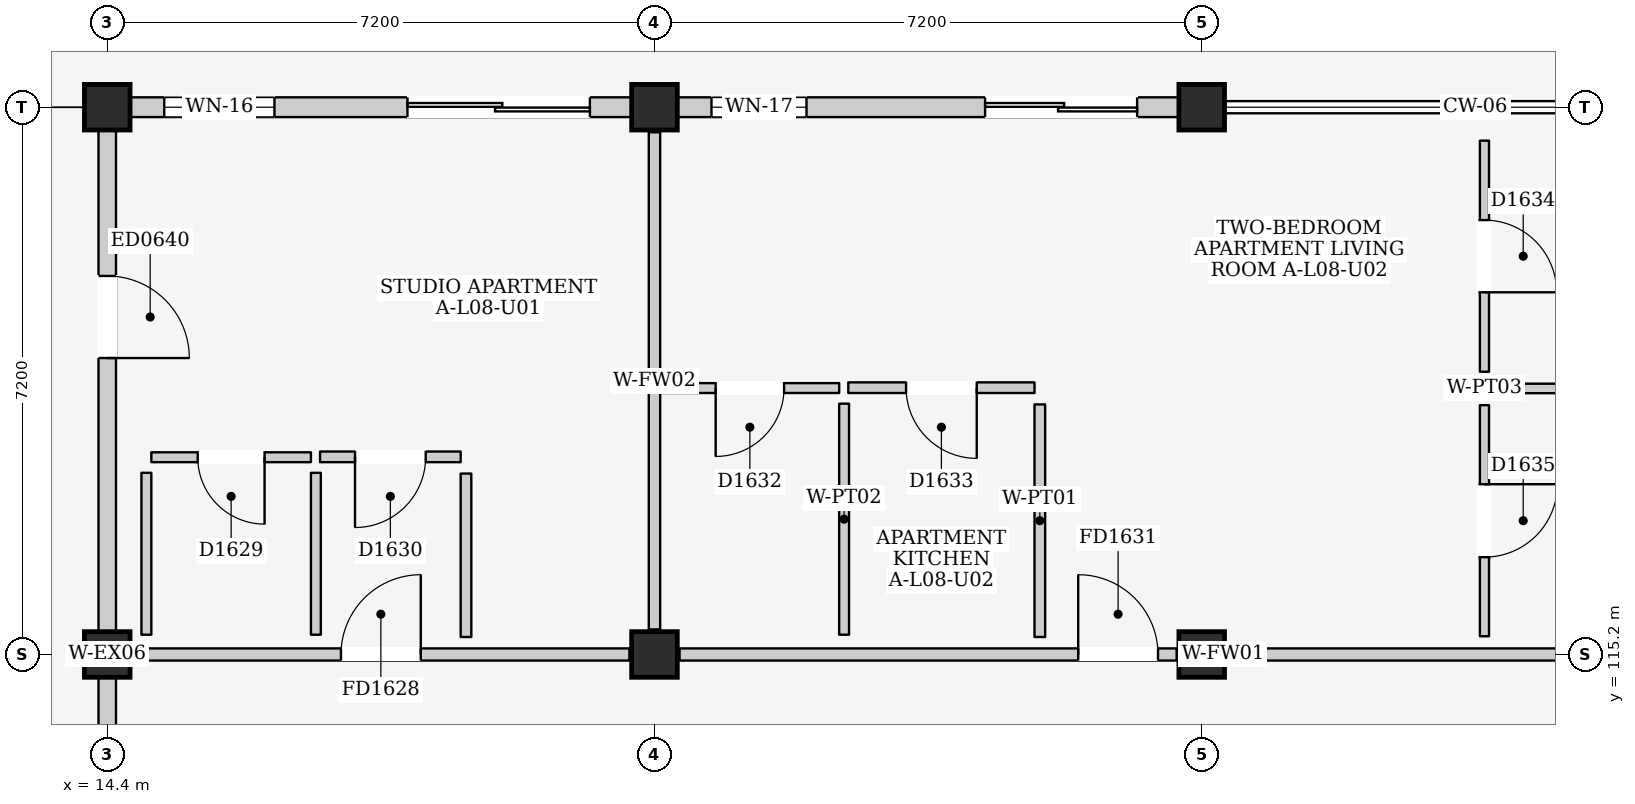
"""IFC4 building model, lengths in metres.
Left out: names, types, materials, properties, quantities, classifications, styles, units other than length and angle.
Written with IfcOpenShell. Run it as: python <this file> out.ifc"""

import sys

from ifc_helpers import new_model, si_unit, direction, frame, frame_2d, origin, origin_2d, place, context, subcontext, project, spatial, rectangle, extrude, element, fill, save


model = new_model("IFC4")
c1 = context("Model", 3, precision=1e-05, world=origin(), true_north=direction((0.0, 1.0)))
c2 = subcontext(c1, "Body", "Model", "MODEL_VIEW")
j1 = project(units=[si_unit("LENGTHUNIT", "METRE"), si_unit("PLANEANGLEUNIT", "RADIAN")], contexts=[c1])
p1 = place(None, origin())
s1 = spatial("IfcSite", under=j1, at=p1, CompositionType="ELEMENT")
p2 = place(p1, origin())
s2 = spatial("IfcBuilding", under=s1, at=p2, CompositionType="ELEMENT")
p3 = place(p2, frame((0.0, 0.0, 28.3)))
s3 = spatial("IfcBuildingStorey", under=s2, at=p3, CompositionType="ELEMENT", Elevation=28.3)
for number, where, z_axis, x_axis in (
    (1, (14.4, 115.2, 0.0), (0.0, 0.0, 1.0), (1.0, 0.0, 0.0)),
    (2, (14.4, 122.4, 0.0), (0.0, 0.0, 1.0), (1.0, 0.0, 0.0)),
    (3, (21.6, 115.2, 0.0), (0.0, 0.0, 1.0), (1.0, 0.0, 0.0)),
    (4, (21.6, 122.4, 0.0), (0.0, 0.0, 1.0), (1.0, 0.0, 0.0)),
    (5, (28.8, 115.2, 0.0), (0.0, 0.0, 1.0), (1.0, 0.0, 0.0)),
    (6, (28.8, 122.4, 0.0), (0.0, 0.0, 1.0), (1.0, 0.0, 0.0)),
):
    element("IfcColumn", number, at=place(p3, frame(where, z_axis=z_axis, x_axis=x_axis)), inside=s3, PredefinedType="COLUMN", context=c2, shape_type="SweptSolid", body=[
        extrude(rectangle(XDim=0.6, YDim=0.6, at=origin_2d()), origin(), (0.0, 0.0, 1.0), 3.2),
    ])
p4 = place(p3, frame((14.7, 122.4, 0.0), z_axis=(0.0, 0.0, 1.0), x_axis=(1.0, 0.0, 0.0)))
e7 = element("IfcWall", 7, at=p4, inside=s3, PredefinedType="ELEMENTEDWALL", context=c2, shape_type="SweptSolid", body=[
    extrude(rectangle(XDim=6.6, YDim=0.26, at=frame_2d((3.3, 0.0))), origin(), (0.0, 0.0, 1.0), 2.485),
])
p5 = place(p4, frame((3.65, 0.0, 0.0)))
e8 = element("IfcOpeningElement", 8, at=p5, cuts=e7, PredefinedType="OPENING", context=c2, shape_type="SweptSolid", body=[
    extrude(rectangle(XDim=2.4, YDim=2.12, at=frame_2d((1.2, 1.06))), frame((0.0, 0.145, 0.0), z_axis=(0.0, -1.0, 0.0), x_axis=(1.0, 0.0, 0.0)), (0.0, 0.0, 1.0), 0.29),
])
p6 = place(p4, frame((0.45, 0.0, 0.9)))
e9 = element("IfcOpeningElement", 9, at=p6, cuts=e7, PredefinedType="OPENING", context=c2, shape_type="SweptSolid", body=[
    extrude(rectangle(XDim=1.45, YDim=1.4, at=frame_2d((0.725, 0.7))), frame((0.0, 0.145, 0.0), z_axis=(0.0, -1.0, 0.0), x_axis=(1.0, 0.0, 0.0)), (0.0, 0.0, 1.0), 0.29),
])
p7 = place(p3, frame((21.9, 122.4, 0.0), z_axis=(0.0, 0.0, 1.0), x_axis=(1.0, 0.0, 0.0)))
e10 = element("IfcWall", 10, at=p7, inside=s3, PredefinedType="ELEMENTEDWALL", context=c2, shape_type="SweptSolid", body=[
    extrude(rectangle(XDim=6.6, YDim=0.26, at=frame_2d((3.3, 0.0))), origin(), (0.0, 0.0, 1.0), 2.485),
])
p8 = place(p7, frame((4.05, 0.0, 0.0)))
e11 = element("IfcOpeningElement", 11, at=p8, cuts=e10, PredefinedType="OPENING", context=c2, shape_type="SweptSolid", body=[
    extrude(rectangle(XDim=2.0, YDim=2.12, at=frame_2d((1.0, 1.06))), frame((0.0, 0.145, 0.0), z_axis=(0.0, -1.0, 0.0), x_axis=(1.0, 0.0, 0.0)), (0.0, 0.0, 1.0), 0.29),
])
p9 = place(p7, frame((0.45, 0.0, 0.9)))
e12 = element("IfcOpeningElement", 12, at=p9, cuts=e10, PredefinedType="OPENING", context=c2, shape_type="SweptSolid", body=[
    extrude(rectangle(XDim=1.25, YDim=1.3, at=frame_2d((0.625, 0.65))), frame((0.0, 0.145, 0.0), z_axis=(0.0, -1.0, 0.0), x_axis=(1.0, 0.0, 0.0)), (0.0, 0.0, 1.0), 0.29),
])
p10 = place(p3, frame((14.4, 108.3, 0.0), z_axis=(0.0, 0.0, 1.0), x_axis=(0.0, 1.0, 0.0)))
e13 = element("IfcWall", 13, at=p10, inside=s3, PredefinedType="ELEMENTEDWALL", context=c2, shape_type="SweptSolid", body=[
    extrude(rectangle(XDim=6.6, YDim=0.23, at=frame_2d((3.3, 0.0))), origin(), (0.0, 0.0, 1.0), 2.435),
])
p11 = place(p10, frame((2.75, 0.0, 1.1)))
e14 = element("IfcOpeningElement", 14, at=p11, cuts=e13, PredefinedType="OPENING", context=c2, shape_type="SweptSolid", body=[
    extrude(rectangle(XDim=1.0, YDim=0.9, at=frame_2d((0.5, 0.45))), frame((0.0, 0.13, 0.0), z_axis=(0.0, -1.0, 0.0), x_axis=(1.0, 0.0, 0.0)), (0.0, 0.0, 1.0), 0.26),
])
p12 = place(p3, frame((14.4, 115.5, 0.0), z_axis=(0.0, 0.0, 1.0), x_axis=(0.0, 1.0, 0.0)))
e15 = element("IfcWall", 15, at=p12, inside=s3, PredefinedType="ELEMENTEDWALL", context=c2, shape_type="SweptSolid", body=[
    extrude(rectangle(XDim=6.6, YDim=0.23, at=frame_2d((3.3, 0.0))), origin(), (0.0, 0.0, 1.0), 2.435),
])
p13 = place(p12, frame((3.6, 0.0, 0.0)))
e16 = element("IfcOpeningElement", 16, at=p13, cuts=e15, PredefinedType="OPENING", context=c2, shape_type="SweptSolid", body=[
    extrude(rectangle(XDim=1.08, YDim=2.12, at=frame_2d((0.54, 1.06))), frame((0.0, 0.13, 0.0), z_axis=(0.0, -1.0, 0.0), x_axis=(1.0, 0.0, 0.0)), (0.0, 0.0, 1.0), 0.26),
])
p14 = place(p3, frame((14.73, 115.2, 0.0), z_axis=(0.0, 0.0, 1.0), x_axis=(1.0, 0.0, 0.0)))
e17 = element("IfcWall", 17, at=p14, inside=s3, PredefinedType="PARTITIONING", context=c2, shape_type="SweptSolid", body=[
    extrude(rectangle(XDim=6.54, YDim=0.16, at=frame_2d((3.27, 0.0))), origin(), (0.0, 0.0, 1.0), 2.285),
])
p15 = place(p14, frame((2.745, 0.0, 0.0)))
e18 = element("IfcOpeningElement", 18, at=p15, cuts=e17, PredefinedType="OPENING", context=c2, shape_type="SweptSolid", body=[
    extrude(rectangle(XDim=1.05, YDim=2.15, at=frame_2d((0.525, 1.075))), frame((0.0, 0.095, 0.0), z_axis=(0.0, -1.0, 0.0), x_axis=(1.0, 0.0, 0.0)), (0.0, 0.0, 1.0), 0.19),
])
p16 = place(p3, frame((21.6, 115.53, 0.0), z_axis=(0.0, 0.0, 1.0), x_axis=(0.0, 1.0, 0.0)))
e19 = element("IfcWall", 19, at=p16, inside=s3, PredefinedType="PARTITIONING", context=c2, shape_type="SweptSolid", body=[
    extrude(rectangle(XDim=6.54, YDim=0.15, at=frame_2d((3.27, 0.0))), origin(), (0.0, 0.0, 1.0), 2.435),
])
p17 = place(p3, frame((14.98, 117.795, 0.0), z_axis=(0.0, 0.0, 1.0), x_axis=(1.0, 0.0, 0.0)))
e20 = element("IfcWall", 20, at=p17, inside=s3, PredefinedType="PARTITIONING", context=c2, shape_type="SweptSolid", body=[
    extrude(rectangle(XDim=2.1, YDim=0.13, at=frame_2d((1.05, 0.0))), origin(), (0.0, 0.0, 1.0), 2.95),
])
p18 = place(p17, frame((0.61, 0.0, 0.0)))
e21 = element("IfcOpeningElement", 21, at=p18, cuts=e20, PredefinedType="OPENING", context=c2, shape_type="SweptSolid", body=[
    extrude(rectangle(XDim=0.88, YDim=2.1, at=frame_2d((0.44, 1.05))), frame((0.0, 0.08, 0.0), z_axis=(0.0, -1.0, 0.0), x_axis=(1.0, 0.0, 0.0)), (0.0, 0.0, 1.0), 0.16),
])
for number, where, z_axis, x_axis in (
    (22, (17.145, 115.46, 0.0), (0.0, 0.0, 1.0), (0.0, 1.0, 0.0)),
    (23, (14.915, 115.46, 0.0), (0.0, 0.0, 1.0), (0.0, 1.0, 0.0)),
):
    element("IfcWall", number, at=place(p3, frame(where, z_axis=z_axis, x_axis=x_axis)), inside=s3, PredefinedType="PARTITIONING", context=c2, shape_type="SweptSolid", body=[
        extrude(rectangle(XDim=2.13, YDim=0.13, at=frame_2d((1.065, 0.0))), origin(), (0.0, 0.0, 1.0), 2.95),
    ])
p19 = place(p3, frame((17.2, 117.8, 0.0), z_axis=(0.0, 0.0, 1.0), x_axis=(1.0, 0.0, 0.0)))
e24 = element("IfcWall", 24, at=p19, inside=s3, PredefinedType="PARTITIONING", context=c2, shape_type="SweptSolid", body=[
    extrude(rectangle(XDim=1.85, YDim=0.14, at=frame_2d((0.925, 0.0))), origin(), (0.0, 0.0, 1.0), 2.95),
])
p20 = place(p19, frame((0.46, 0.0, 0.0)))
e25 = element("IfcOpeningElement", 25, at=p20, cuts=e24, PredefinedType="OPENING", context=c2, shape_type="SweptSolid", body=[
    extrude(rectangle(XDim=0.93, YDim=2.14, at=frame_2d((0.465, 1.07))), frame((0.0, 0.085, 0.0), z_axis=(0.0, -1.0, 0.0), x_axis=(1.0, 0.0, 0.0)), (0.0, 0.0, 1.0), 0.17),
])
p21 = place(p3, frame((19.12, 115.43, 0.0), z_axis=(0.0, 0.0, 1.0), x_axis=(0.0, 1.0, 0.0)))
e26 = element("IfcWall", 26, at=p21, inside=s3, PredefinedType="PARTITIONING", context=c2, shape_type="SweptSolid", body=[
    extrude(rectangle(XDim=2.15, YDim=0.14, at=frame_2d((1.075, 0.0))), origin(), (0.0, 0.0, 1.0), 2.95),
])
p22 = place(p3, frame((21.93, 115.2, 0.0), z_axis=(0.0, 0.0, 1.0), x_axis=(1.0, 0.0, 0.0)))
e27 = element("IfcWall", 27, at=p22, inside=s3, PredefinedType="PARTITIONING", context=c2, shape_type="SweptSolid", body=[
    extrude(rectangle(XDim=6.54, YDim=0.16, at=frame_2d((3.27, 0.0))), origin(), (0.0, 0.0, 1.0), 2.285),
])
p23 = place(p22, frame((5.245, 0.0, 0.0)))
e28 = element("IfcOpeningElement", 28, at=p23, cuts=e27, PredefinedType="OPENING", context=c2, shape_type="SweptSolid", body=[
    extrude(rectangle(XDim=1.05, YDim=2.15, at=frame_2d((0.525, 1.075))), frame((0.0, 0.095, 0.0), z_axis=(0.0, -1.0, 0.0), x_axis=(1.0, 0.0, 0.0)), (0.0, 0.0, 1.0), 0.19),
])
p24 = place(p3, frame((29.13, 115.2, 0.0), z_axis=(0.0, 0.0, 1.0), x_axis=(1.0, 0.0, 0.0)))
e29 = element("IfcWall", 29, at=p24, inside=s3, PredefinedType="PARTITIONING", context=c2, shape_type="SweptSolid", body=[
    extrude(rectangle(XDim=6.54, YDim=0.16, at=frame_2d((3.27, 0.0))), origin(), (0.0, 0.0, 1.0), 2.285),
])
p25 = place(p3, frame((21.68, 118.705, 0.0), z_axis=(0.0, 0.0, 1.0), x_axis=(1.0, 0.0, 0.0)))
e30 = element("IfcWall", 30, at=p25, inside=s3, PredefinedType="PARTITIONING", context=c2, shape_type="SweptSolid", body=[
    extrude(rectangle(XDim=2.35, YDim=0.13, at=frame_2d((1.175, 0.0))), origin(), (0.0, 0.0, 1.0), 2.95),
])
p26 = place(p25, frame((0.725, 0.0, 0.0)))
e31 = element("IfcOpeningElement", 31, at=p26, cuts=e30, PredefinedType="OPENING", context=c2, shape_type="SweptSolid", body=[
    extrude(rectangle(XDim=0.9, YDim=2.1, at=frame_2d((0.45, 1.05))), frame((0.0, 0.08, 0.0), z_axis=(0.0, -1.0, 0.0), x_axis=(1.0, 0.0, 0.0)), (0.0, 0.0, 1.0), 0.16),
])
p27 = place(p3, frame((24.095, 115.46, 0.0), z_axis=(0.0, 0.0, 1.0), x_axis=(0.0, 1.0, 0.0)))
e32 = element("IfcWall", 32, at=p27, inside=s3, PredefinedType="PARTITIONING", context=c2, shape_type="SweptSolid", body=[
    extrude(rectangle(XDim=3.04, YDim=0.13, at=frame_2d((1.52, 0.0))), origin(), (0.0, 0.0, 1.0), 2.95),
])
p28 = place(p3, frame((24.15, 118.71, 0.0), z_axis=(0.0, 0.0, 1.0), x_axis=(1.0, 0.0, 0.0)))
e33 = element("IfcWall", 33, at=p28, inside=s3, PredefinedType="PARTITIONING", context=c2, shape_type="SweptSolid", body=[
    extrude(rectangle(XDim=2.45, YDim=0.14, at=frame_2d((1.225, 0.0))), origin(), (0.0, 0.0, 1.0), 2.95),
])
p29 = place(p28, frame((0.76, 0.0, 0.0)))
e34 = element("IfcOpeningElement", 34, at=p29, cuts=e33, PredefinedType="OPENING", context=c2, shape_type="SweptSolid", body=[
    extrude(rectangle(XDim=0.93, YDim=2.14, at=frame_2d((0.465, 1.07))), frame((0.0, 0.085, 0.0), z_axis=(0.0, -1.0, 0.0), x_axis=(1.0, 0.0, 0.0)), (0.0, 0.0, 1.0), 0.17),
])
p30 = place(p3, frame((26.67, 115.43, 0.0), z_axis=(0.0, 0.0, 1.0), x_axis=(0.0, 1.0, 0.0)))
e35 = element("IfcWall", 35, at=p30, inside=s3, PredefinedType="PARTITIONING", context=c2, shape_type="SweptSolid", body=[
    extrude(rectangle(XDim=3.06, YDim=0.14, at=frame_2d((1.53, 0.0))), origin(), (0.0, 0.0, 1.0), 2.95),
])
p31 = place(p3, frame((32.52, 118.92, 0.0), z_axis=(0.0, 0.0, 1.0), x_axis=(0.0, 1.0, 0.0)))
e36 = element("IfcWall", 36, at=p31, inside=s3, PredefinedType="PARTITIONING", context=c2, shape_type="SweptSolid", body=[
    extrude(rectangle(XDim=3.04, YDim=0.12, at=frame_2d((1.52, 0.0))), origin(), (0.0, 0.0, 1.0), 2.95),
])
p32 = place(p31, frame((1.045, 0.0, 0.0)))
e37 = element("IfcOpeningElement", 37, at=p32, cuts=e36, PredefinedType="OPENING", context=c2, shape_type="SweptSolid", body=[
    extrude(rectangle(XDim=0.95, YDim=2.15, at=frame_2d((0.475, 1.075))), frame((0.0, 0.075, 0.0), z_axis=(0.0, -1.0, 0.0), x_axis=(1.0, 0.0, 0.0)), (0.0, 0.0, 1.0), 0.15),
])
p33 = place(p3, frame((32.72, 118.7, 0.0), z_axis=(0.0, 0.0, 1.0), x_axis=(1.0, 0.0, 0.0)))
e38 = element("IfcWall", 38, at=p33, inside=s3, PredefinedType="PARTITIONING", context=c2, shape_type="SweptSolid", body=[
    extrude(rectangle(XDim=3.06, YDim=0.125, at=frame_2d((1.53, 0.0))), origin(), (0.0, 0.0, 1.0), 2.95),
])
p34 = place(p3, frame((32.52, 115.44, 0.0), z_axis=(0.0, 0.0, 1.0), x_axis=(0.0, 1.0, 0.0)))
e39 = element("IfcWall", 39, at=p34, inside=s3, PredefinedType="PARTITIONING", context=c2, shape_type="SweptSolid", body=[
    extrude(rectangle(XDim=3.04, YDim=0.12, at=frame_2d((1.52, 0.0))), origin(), (0.0, 0.0, 1.0), 2.95),
])
p35 = place(p34, frame((1.04, 0.0, 0.0)))
e40 = element("IfcOpeningElement", 40, at=p35, cuts=e39, PredefinedType="OPENING", context=c2, shape_type="SweptSolid", body=[
    extrude(rectangle(XDim=0.96, YDim=2.15, at=frame_2d((0.48, 1.075))), frame((0.0, 0.075, 0.0), z_axis=(0.0, -1.0, 0.0), x_axis=(1.0, 0.0, 0.0)), (0.0, 0.0, 1.0), 0.15),
])
p36 = place(p5, frame((2.4, 0.0, 0.0), z_axis=(0.0, 0.0, 1.0), x_axis=(-1.0, 0.0, 0.0)))
e41 = element("IfcDoor", 41, at=p36, inside=s3, OperationType="DOUBLE_DOOR_SLIDING", PredefinedType="DOOR", context=c2, shape_type="SweptSolid", body=[
    extrude(rectangle(XDim=2.4, YDim=2.12, at=frame_2d((1.2, 1.06))), frame((0.0, 0.025, 0.0), z_axis=(0.0, -1.0, 0.0), x_axis=(1.0, 0.0, 0.0)), (0.0, 0.0, 1.0), 0.05),
])
fill(e8, e41)
p37 = place(p6, origin())
e42 = element("IfcWindow", 42, at=p37, inside=s3, PartitioningType="DOUBLE_PANEL_VERTICAL", PredefinedType="WINDOW", context=c2, shape_type="SweptSolid", body=[
    extrude(rectangle(XDim=1.45, YDim=1.4, at=frame_2d((0.725, 0.7))), frame((0.0, 0.03, 0.0), z_axis=(0.0, -1.0, 0.0), x_axis=(1.0, 0.0, 0.0)), (0.0, 0.0, 1.0), 0.06),
])
fill(e9, e42)
p38 = place(p8, frame((2.0, 0.0, 0.0), z_axis=(0.0, 0.0, 1.0), x_axis=(-1.0, 0.0, 0.0)))
e43 = element("IfcDoor", 43, at=p38, inside=s3, OperationType="DOUBLE_DOOR_SLIDING", PredefinedType="DOOR", context=c2, shape_type="SweptSolid", body=[
    extrude(rectangle(XDim=2.0, YDim=2.12, at=frame_2d((1.0, 1.06))), frame((0.0, 0.025, 0.0), z_axis=(0.0, -1.0, 0.0), x_axis=(1.0, 0.0, 0.0)), (0.0, 0.0, 1.0), 0.05),
])
fill(e11, e43)
p39 = place(p9, origin())
e44 = element("IfcWindow", 44, at=p39, inside=s3, PartitioningType="SINGLE_PANEL", PredefinedType="WINDOW", context=c2, shape_type="SweptSolid", body=[
    extrude(rectangle(XDim=1.25, YDim=1.3, at=frame_2d((0.625, 0.65))), frame((0.0, 0.03, 0.0), z_axis=(0.0, -1.0, 0.0), x_axis=(1.0, 0.0, 0.0)), (0.0, 0.0, 1.0), 0.06),
])
fill(e12, e44)
p40 = place(p13, frame((1.08, 0.0, 0.0), z_axis=(0.0, 0.0, 1.0), x_axis=(-1.0, 0.0, 0.0)))
e45 = element("IfcDoor", 45, at=p40, inside=s3, OperationType="SINGLE_SWING_RIGHT", PredefinedType="DOOR", context=c2, shape_type="SweptSolid", body=[
    extrude(rectangle(XDim=1.08, YDim=2.12, at=frame_2d((0.54, 1.06))), frame((0.0, 0.025, 0.0), z_axis=(0.0, -1.0, 0.0), x_axis=(1.0, 0.0, 0.0)), (0.0, 0.0, 1.0), 0.05),
])
fill(e16, e45)
p41 = place(p15, origin())
e46 = element("IfcDoor", 46, at=p41, inside=s3, OperationType="SINGLE_SWING_RIGHT", PredefinedType="DOOR", context=c2, shape_type="SweptSolid", body=[
    extrude(rectangle(XDim=1.05, YDim=2.15, at=frame_2d((0.525, 1.075))), frame((0.0, 0.025, 0.0), z_axis=(0.0, -1.0, 0.0), x_axis=(1.0, 0.0, 0.0)), (0.0, 0.0, 1.0), 0.05),
])
fill(e18, e46)
p42 = place(p18, frame((0.88, 0.0, 0.0), z_axis=(0.0, 0.0, 1.0), x_axis=(-1.0, 0.0, 0.0)))
e47 = element("IfcDoor", 47, at=p42, inside=s3, OperationType="SINGLE_SWING_LEFT", PredefinedType="DOOR", context=c2, shape_type="SweptSolid", body=[
    extrude(rectangle(XDim=0.88, YDim=2.1, at=frame_2d((0.44, 1.05))), frame((0.0, 0.025, 0.0), z_axis=(0.0, -1.0, 0.0), x_axis=(1.0, 0.0, 0.0)), (0.0, 0.0, 1.0), 0.05),
])
fill(e21, e47)
p43 = place(p20, frame((0.93, 0.0, 0.0), z_axis=(0.0, 0.0, 1.0), x_axis=(-1.0, 0.0, 0.0)))
e48 = element("IfcDoor", 48, at=p43, inside=s3, OperationType="SINGLE_SWING_RIGHT", PredefinedType="DOOR", context=c2, shape_type="SweptSolid", body=[
    extrude(rectangle(XDim=0.93, YDim=2.14, at=frame_2d((0.465, 1.07))), frame((0.0, 0.025, 0.0), z_axis=(0.0, -1.0, 0.0), x_axis=(1.0, 0.0, 0.0)), (0.0, 0.0, 1.0), 0.05),
])
fill(e25, e48)
p44 = place(p23, origin())
e49 = element("IfcDoor", 49, at=p44, inside=s3, OperationType="SINGLE_SWING_LEFT", PredefinedType="DOOR", context=c2, shape_type="SweptSolid", body=[
    extrude(rectangle(XDim=1.05, YDim=2.15, at=frame_2d((0.525, 1.075))), frame((0.0, 0.025, 0.0), z_axis=(0.0, -1.0, 0.0), x_axis=(1.0, 0.0, 0.0)), (0.0, 0.0, 1.0), 0.05),
])
fill(e28, e49)
p45 = place(p26, frame((0.9, 0.0, 0.0), z_axis=(0.0, 0.0, 1.0), x_axis=(-1.0, 0.0, 0.0)))
e50 = element("IfcDoor", 50, at=p45, inside=s3, OperationType="SINGLE_SWING_RIGHT", PredefinedType="DOOR", context=c2, shape_type="SweptSolid", body=[
    extrude(rectangle(XDim=0.9, YDim=2.1, at=frame_2d((0.45, 1.05))), frame((0.0, 0.025, 0.0), z_axis=(0.0, -1.0, 0.0), x_axis=(1.0, 0.0, 0.0)), (0.0, 0.0, 1.0), 0.05),
])
fill(e31, e50)
p46 = place(p29, frame((0.93, 0.0, 0.0), z_axis=(0.0, 0.0, 1.0), x_axis=(-1.0, 0.0, 0.0)))
e51 = element("IfcDoor", 51, at=p46, inside=s3, OperationType="SINGLE_SWING_LEFT", PredefinedType="DOOR", context=c2, shape_type="SweptSolid", body=[
    extrude(rectangle(XDim=0.93, YDim=2.14, at=frame_2d((0.465, 1.07))), frame((0.0, 0.025, 0.0), z_axis=(0.0, -1.0, 0.0), x_axis=(1.0, 0.0, 0.0)), (0.0, 0.0, 1.0), 0.05),
])
fill(e34, e51)
p47 = place(p32, frame((0.95, 0.0, 0.0), z_axis=(0.0, 0.0, 1.0), x_axis=(-1.0, 0.0, 0.0)))
e52 = element("IfcDoor", 52, at=p47, inside=s3, OperationType="SINGLE_SWING_RIGHT", PredefinedType="DOOR", context=c2, shape_type="SweptSolid", body=[
    extrude(rectangle(XDim=0.95, YDim=2.15, at=frame_2d((0.475, 1.075))), frame((0.0, 0.025, 0.0), z_axis=(0.0, -1.0, 0.0), x_axis=(1.0, 0.0, 0.0)), (0.0, 0.0, 1.0), 0.05),
])
fill(e37, e52)
p48 = place(p35, frame((0.96, 0.0, 0.0), z_axis=(0.0, 0.0, 1.0), x_axis=(-1.0, 0.0, 0.0)))
e53 = element("IfcDoor", 53, at=p48, inside=s3, OperationType="SINGLE_SWING_LEFT", PredefinedType="DOOR", context=c2, shape_type="SweptSolid", body=[
    extrude(rectangle(XDim=0.96, YDim=2.15, at=frame_2d((0.48, 1.075))), frame((0.0, 0.025, 0.0), z_axis=(0.0, -1.0, 0.0), x_axis=(1.0, 0.0, 0.0)), (0.0, 0.0, 1.0), 0.05),
])
fill(e40, e53)
save(model, sys.argv[1])
